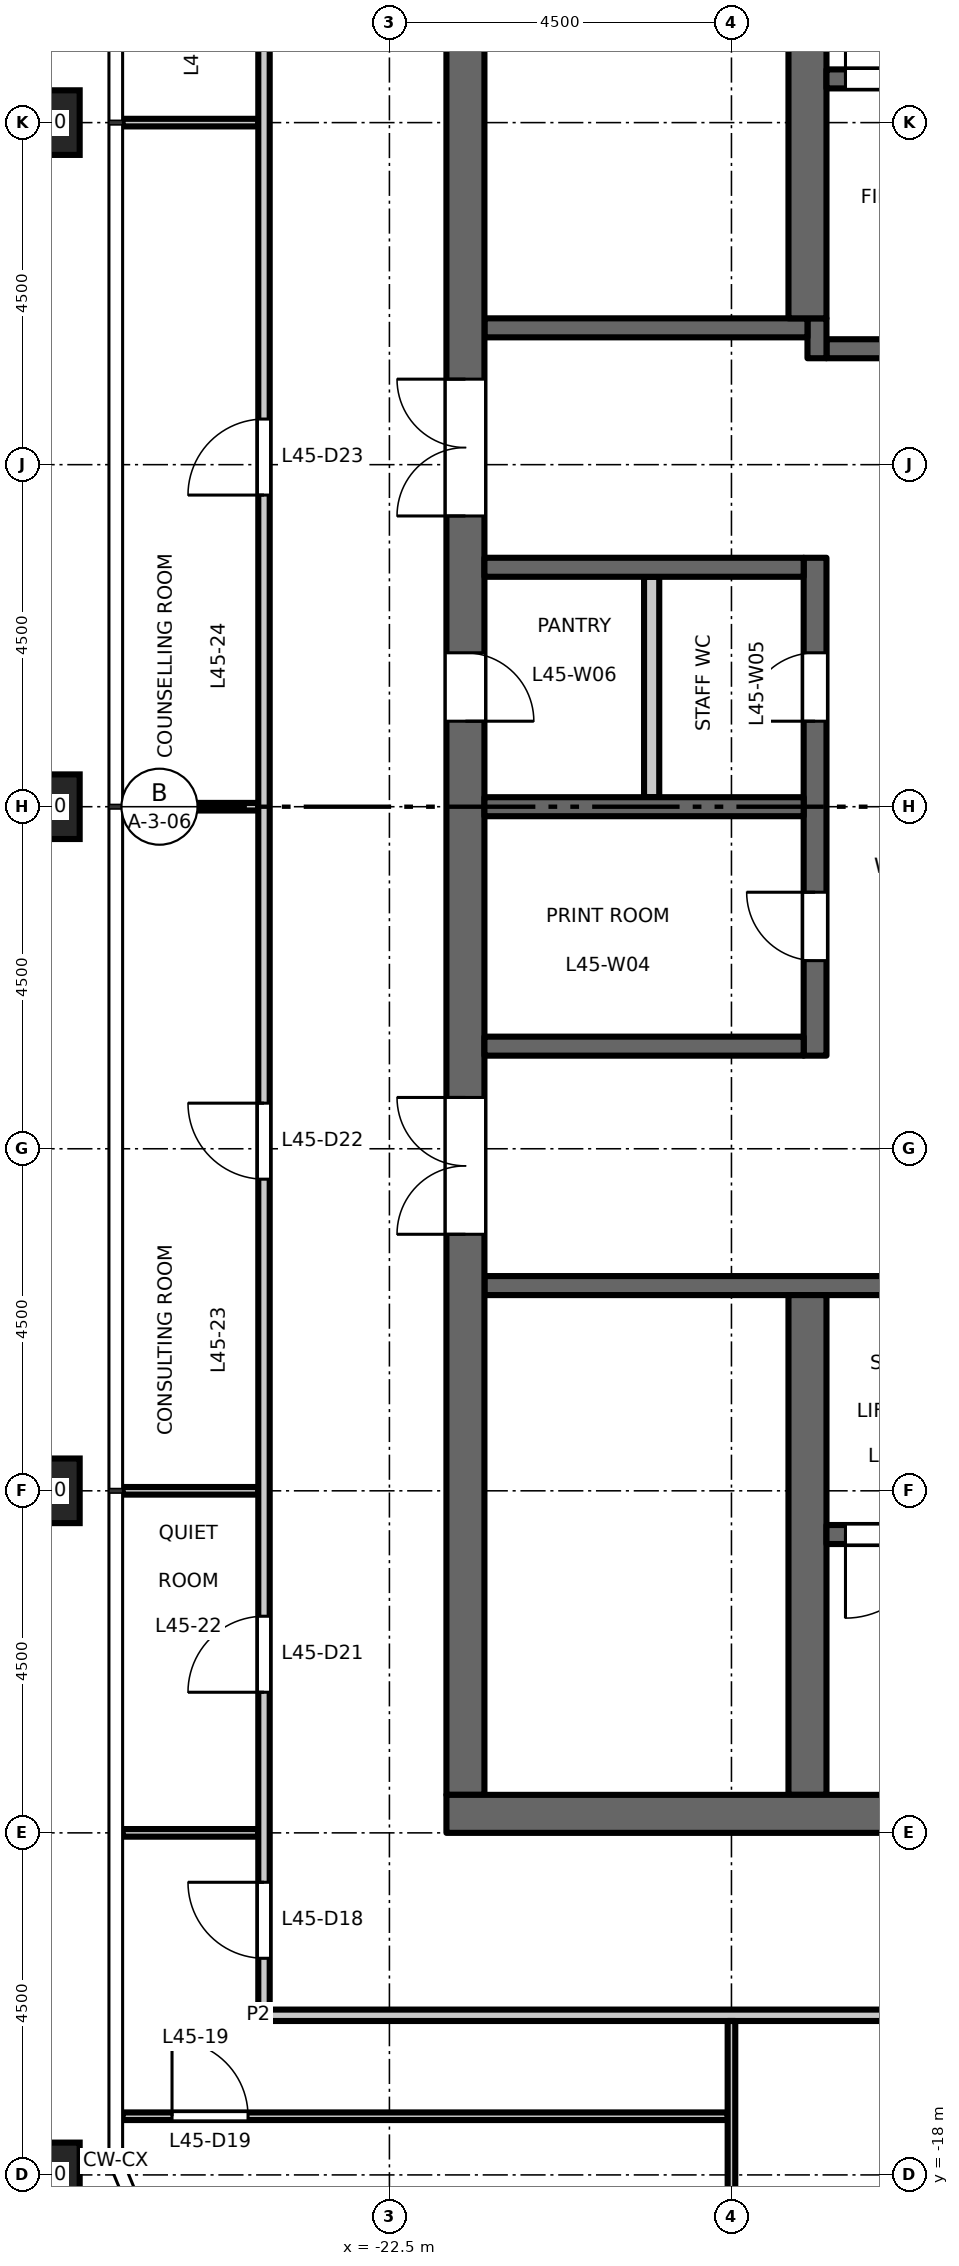
"""IFC4 building model, lengths in metres.
Left out: names, types, materials, properties, quantities, classifications, styles, units other than length and angle.
Written with IfcOpenShell. Run it as: python <this file> out.ifc"""

import sys

from ifc_helpers import new_model, si_unit, direction, frame, frame_2d, origin, origin_2d, place, context, subcontext, project, spatial, rectangle, hollow_rectangle, extrude, element, fill, save


model = new_model("IFC4")
c1 = context("Model", 3, precision=1e-05, world=origin(), true_north=direction((0.0, 1.0)))
c2 = subcontext(c1, "Body", "Model", "MODEL_VIEW")
j1 = project(units=[si_unit("LENGTHUNIT", "METRE"), si_unit("PLANEANGLEUNIT", "RADIAN")], contexts=[c1])
p1 = place(None, origin())
s1 = spatial("IfcSite", under=j1, at=p1, CompositionType="ELEMENT")
p2 = place(p1, origin())
s2 = spatial("IfcBuilding", under=s1, at=p2, CompositionType="ELEMENT")
p3 = place(p2, frame((0.0, 0.0, 210.7)))
s3 = spatial("IfcBuildingStorey", under=s2, at=p3, CompositionType="ELEMENT", Elevation=210.7)
for number, where, z_axis, x_axis in (
    (1, (-27.0, 9.0, 0.0), (0.0, 0.0, 1.0), (1.0, 0.0, 0.0)),
    (2, (-27.0, 0.0, 0.0), (0.0, 0.0, 1.0), (1.0, 0.0, 0.0)),
    (3, (-27.0, -9.0, 0.0), (0.0, 0.0, 1.0), (1.0, 0.0, 0.0)),
    (4, (-27.0, -18.0, 0.0), (0.0, 0.0, 1.0), (1.0, 0.0, 0.0)),
):
    element("IfcColumn", number, at=place(p3, frame(where, z_axis=z_axis, x_axis=x_axis)), inside=s3, PredefinedType="COLUMN", context=c2, shape_type="SweptSolid", body=[
        extrude(hollow_rectangle(XDim=0.85, YDim=0.85, WallThickness=0.05, at=origin_2d()), origin(), (0.0, 0.0, 1.0), 4.5),
    ])
p4 = place(p3, frame((-12.15, 6.025, 0.0), z_axis=(0.0, 0.0, 1.0), x_axis=(-1.0, 0.0, 0.0)))
e5 = element("IfcWall", 5, at=p4, inside=s3, PredefinedType="SHEAR", context=c2, shape_type="SweptSolid", body=[
    extrude(rectangle(XDim=4.6, YDim=0.25, at=frame_2d((2.3, 0.0))), origin(), (0.0, 0.0, 1.0), 4.35),
])
p5 = place(p4, frame((1.8, 0.0, 0.0)))
e6 = element("IfcOpeningElement", 6, at=p5, cuts=e5, PredefinedType="OPENING", context=c2, shape_type="SweptSolid", body=[
    extrude(rectangle(XDim=1.0, YDim=2.1, at=frame_2d((0.5, 1.05))), frame((0.0, 0.135, 0.0), z_axis=(0.0, -1.0, 0.0), x_axis=(1.0, 0.0, 0.0)), (0.0, 0.0, 1.0), 0.27),
])
p6 = place(p3, frame((-16.875, 5.9, 0.0), z_axis=(0.0, 0.0, 1.0), x_axis=(0.0, 1.0, 0.0)))
e7 = element("IfcWall", 7, at=p6, inside=s3, PredefinedType="SHEAR", context=c2, shape_type="SweptSolid", body=[
    extrude(rectangle(XDim=0.525, YDim=0.25, at=frame_2d((0.263, 0.0))), origin(), (0.0, 0.0, 1.0), 4.35),
])
p7 = place(p3, frame((-17.0, 6.3, 0.0), z_axis=(0.0, 0.0, 1.0), x_axis=(-1.0, 0.0, 0.0)))
e8 = element("IfcWall", 8, at=p7, inside=s3, PredefinedType="SHEAR", context=c2, shape_type="SweptSolid", body=[
    extrude(rectangle(XDim=4.25, YDim=0.25, at=frame_2d((2.125, 0.0))), origin(), (0.0, 0.0, 1.0), 4.35),
])
p8 = place(p3, frame((-12.15, -6.3, 0.0), z_axis=(0.0, 0.0, 1.0), x_axis=(-1.0, 0.0, 0.0)))
e9 = element("IfcWall", 9, at=p8, inside=s3, PredefinedType="SHEAR", context=c2, shape_type="SweptSolid", body=[
    extrude(rectangle(XDim=9.1, YDim=0.25, at=frame_2d((4.55, 0.0))), origin(), (0.0, 0.0, 1.0), 4.35),
])
p9 = place(p8, frame((1.8, 0.0, 0.0)))
e10 = element("IfcOpeningElement", 10, at=p9, cuts=e9, PredefinedType="OPENING", context=c2, shape_type="SweptSolid", body=[
    extrude(rectangle(XDim=1.0, YDim=2.1, at=frame_2d((0.5, 1.05))), frame((0.0, 0.135, 0.0), z_axis=(0.0, -1.0, 0.0), x_axis=(1.0, 0.0, 0.0)), (0.0, 0.0, 1.0), 0.27),
])
p10 = place(p3, frame((-21.5, -13.0, 0.0), z_axis=(0.0, 0.0, 1.0), x_axis=(0.0, 1.0, 0.0)))
e11 = element("IfcWall", 11, at=p10, inside=s3, PredefinedType="SHEAR", context=c2, shape_type="SweptSolid", body=[
    extrude(rectangle(XDim=26.0, YDim=0.5, at=frame_2d((13.0, 0.0))), origin(), (0.0, 0.0, 1.0), 4.35),
])
p11 = place(p10, frame((16.825, 0.0, 0.0)))
e12 = element("IfcOpeningElement", 12, at=p11, cuts=e11, PredefinedType="OPENING", context=c2, shape_type="SweptSolid", body=[
    extrude(rectangle(XDim=1.8, YDim=2.1, at=frame_2d((0.9, 1.05))), frame((0.0, 0.26, 0.0), z_axis=(0.0, -1.0, 0.0), x_axis=(1.0, 0.0, 0.0)), (0.0, 0.0, 1.0), 0.52),
])
p12 = place(p10, frame((7.375, 0.0, 0.0)))
e13 = element("IfcOpeningElement", 13, at=p12, cuts=e11, PredefinedType="OPENING", context=c2, shape_type="SweptSolid", body=[
    extrude(rectangle(XDim=1.8, YDim=2.1, at=frame_2d((0.9, 1.05))), frame((0.0, 0.26, 0.0), z_axis=(0.0, -1.0, 0.0), x_axis=(1.0, 0.0, 0.0)), (0.0, 0.0, 1.0), 0.52),
])
p13 = place(p10, frame((14.125, 0.0, 0.0)))
e14 = element("IfcOpeningElement", 14, at=p13, cuts=e11, PredefinedType="OPENING", context=c2, shape_type="SweptSolid", body=[
    extrude(rectangle(XDim=0.9, YDim=2.1, at=frame_2d((0.45, 1.05))), frame((0.0, 0.26, 0.0), z_axis=(0.0, -1.0, 0.0), x_axis=(1.0, 0.0, 0.0)), (0.0, 0.0, 1.0), 0.52),
])
p14 = place(p3, frame((-16.9, -3.275, 0.0), z_axis=(0.0, 0.0, 1.0), x_axis=(0.0, 1.0, 0.0)))
e15 = element("IfcWall", 15, at=p14, inside=s3, PredefinedType="SHEAR", context=c2, shape_type="SweptSolid", body=[
    extrude(rectangle(XDim=6.55, YDim=0.3, at=frame_2d((3.275, 0.0))), origin(), (0.0, 0.0, 1.0), 4.35),
])
p15 = place(p14, frame((1.25, 0.0, 0.0)))
e16 = element("IfcOpeningElement", 16, at=p15, cuts=e15, PredefinedType="OPENING", context=c2, shape_type="SweptSolid", body=[
    extrude(rectangle(XDim=0.9, YDim=2.1, at=frame_2d((0.45, 1.05))), frame((0.0, 0.16, 0.0), z_axis=(0.0, -1.0, 0.0), x_axis=(1.0, 0.0, 0.0)), (0.0, 0.0, 1.0), 0.32),
])
p16 = place(p14, frame((4.4, 0.0, 0.0)))
e17 = element("IfcOpeningElement", 17, at=p16, cuts=e15, PredefinedType="OPENING", context=c2, shape_type="SweptSolid", body=[
    extrude(rectangle(XDim=0.9, YDim=2.1, at=frame_2d((0.45, 1.05))), frame((0.0, 0.16, 0.0), z_axis=(0.0, -1.0, 0.0), x_axis=(1.0, 0.0, 0.0)), (0.0, 0.0, 1.0), 0.32),
])
for number, where, z_axis, x_axis in (
    (18, (-17.05, 0.0, 0.0), (0.0, 0.0, 1.0), (-1.0, 0.0, 0.0)),
    (19, (-17.05, 3.15, 0.0), (0.0, 0.0, 1.0), (-1.0, 0.0, 0.0)),
    (20, (-17.05, -3.15, 0.0), (0.0, 0.0, 1.0), (-1.0, 0.0, 0.0)),
):
    element("IfcWall", number, at=place(p3, frame(where, z_axis=z_axis, x_axis=x_axis)), inside=s3, PredefinedType="SHEAR", context=c2, shape_type="SweptSolid", body=[
        extrude(rectangle(XDim=4.2, YDim=0.25, at=frame_2d((2.1, 0.0))), origin(), (0.0, 0.0, 1.0), 4.35),
    ])
p17 = place(p3, frame((-19.05, 0.125, 0.0), z_axis=(0.0, 0.0, 1.0), x_axis=(0.0, 1.0, 0.0)))
e21 = element("IfcWall", 21, at=p17, inside=s3, PredefinedType="PARTITIONING", context=c2, shape_type="SweptSolid", body=[
    extrude(rectangle(XDim=2.9, YDim=0.2, at=frame_2d((1.45, 0.0))), origin(), (0.0, 0.0, 1.0), 4.35),
])
for number, where, z_axis, x_axis in (
    (22, (-17.0, 6.425, 0.0), (0.0, 0.0, 1.0), (0.0, 1.0, 0.0)),
    (23, (-17.0, -13.0, 0.0), (0.0, 0.0, 1.0), (0.0, 1.0, 0.0)),
):
    element("IfcWall", number, at=place(p3, frame(where, z_axis=z_axis, x_axis=x_axis)), inside=s3, PredefinedType="SHEAR", context=c2, shape_type="SweptSolid", body=[
        extrude(rectangle(XDim=6.575, YDim=0.5, at=frame_2d((3.288, 0.0))), origin(), (0.0, 0.0, 1.0), 4.35),
    ])
p18 = place(p3, frame((-8.75, 9.575, 0.0), z_axis=(0.0, 0.0, 1.0), x_axis=(-1.0, 0.0, 0.0)))
e24 = element("IfcWall", 24, at=p18, inside=s3, PredefinedType="SHEAR", context=c2, shape_type="SweptSolid", body=[
    extrude(rectangle(XDim=8.0, YDim=0.25, at=frame_2d((4.0, 0.0))), origin(), (0.0, 0.0, 1.0), 4.35),
])
p19 = place(p18, frame((6.65, 0.0, 0.0)))
e25 = element("IfcOpeningElement", 25, at=p19, cuts=e24, PredefinedType="OPENING", context=c2, shape_type="SweptSolid", body=[
    extrude(rectangle(XDim=1.1, YDim=2.1, at=frame_2d((0.55, 1.05))), frame((0.0, 0.135, 0.0), z_axis=(0.0, -1.0, 0.0), x_axis=(1.0, 0.0, 0.0)), (0.0, 0.0, 1.0), 0.27),
])
p20 = place(p3, frame((-8.75, -9.575, 0.0), z_axis=(0.0, 0.0, 1.0), x_axis=(-1.0, 0.0, 0.0)))
e26 = element("IfcWall", 26, at=p20, inside=s3, PredefinedType="SHEAR", context=c2, shape_type="SweptSolid", body=[
    extrude(rectangle(XDim=8.0, YDim=0.25, at=frame_2d((4.0, 0.0))), origin(), (0.0, 0.0, 1.0), 4.35),
])
p21 = place(p20, frame((6.65, 0.0, 0.0)))
e27 = element("IfcOpeningElement", 27, at=p21, cuts=e26, PredefinedType="OPENING", context=c2, shape_type="SweptSolid", body=[
    extrude(rectangle(XDim=1.1, YDim=2.1, at=frame_2d((0.55, 1.05))), frame((0.0, 0.135, 0.0), z_axis=(0.0, -1.0, 0.0), x_axis=(1.0, 0.0, 0.0)), (0.0, 0.0, 1.0), 0.27),
])
p22 = place(p3, frame((-8.25, -13.25, 0.0), z_axis=(0.0, 0.0, 1.0), x_axis=(-1.0, 0.0, 0.0)))
e28 = element("IfcWall", 28, at=p22, inside=s3, PredefinedType="SHEAR", context=c2, shape_type="SweptSolid", body=[
    extrude(rectangle(XDim=13.5, YDim=0.5, at=frame_2d((6.75, 0.0))), origin(), (0.0, 0.0, 1.0), 4.35),
])
p23 = place(p3, frame((-26.01, -17.228, 0.0), z_axis=(0.0, 0.0, 1.0), x_axis=(1.0, 0.0, 0.0)))
e29 = element("IfcWall", 29, at=p23, inside=s3, PredefinedType="PARTITIONING", context=c2, shape_type="SweptSolid", body=[
    extrude(rectangle(XDim=7.96, YDim=0.1, at=frame_2d((3.98, 0.0))), origin(), (0.0, 0.0, 1.0), 4.35),
])
p24 = place(p23, frame((0.65, 0.0, 0.0)))
e30 = element("IfcOpeningElement", 30, at=p24, cuts=e29, PredefinedType="OPENING", context=c2, shape_type="SweptSolid", body=[
    extrude(rectangle(XDim=1.0, YDim=2.1, at=frame_2d((0.5, 1.05))), frame((0.0, 0.06, 0.0), z_axis=(0.0, -1.0, 0.0), x_axis=(1.0, 0.0, 0.0)), (0.0, 0.0, 1.0), 0.12),
])
p25 = place(p3, frame((-24.225, -15.9, 0.0), z_axis=(0.0, 0.0, 1.0), x_axis=(1.0, 0.0, 0.0)))
e31 = element("IfcWall", 31, at=p25, inside=s3, PredefinedType="PARTITIONING", context=c2, shape_type="SweptSolid", body=[
    extrude(rectangle(XDim=48.45, YDim=0.15, at=frame_2d((24.225, 0.0))), origin(), (0.0, 0.0, 1.0), 4.35),
])
p26 = place(p25, frame((10.125, 0.0, 0.0)))
e32 = element("IfcOpeningElement", 32, at=p26, cuts=e31, PredefinedType="OPENING", context=c2, shape_type="SweptSolid", body=[
    extrude(rectangle(XDim=1.0, YDim=2.1, at=frame_2d((0.5, 1.05))), frame((0.0, 0.085, 0.0), z_axis=(0.0, -1.0, 0.0), x_axis=(1.0, 0.0, 0.0)), (0.0, 0.0, 1.0), 0.17),
])
p27 = place(p25, frame((19.125, 0.0, 0.0)))
e33 = element("IfcOpeningElement", 33, at=p27, cuts=e31, PredefinedType="OPENING", context=c2, shape_type="SweptSolid", body=[
    extrude(rectangle(XDim=1.0, YDim=2.1, at=frame_2d((0.5, 1.05))), frame((0.0, 0.085, 0.0), z_axis=(0.0, -1.0, 0.0), x_axis=(1.0, 0.0, 0.0)), (0.0, 0.0, 1.0), 0.17),
])
p28 = place(p25, frame((28.125, 0.0, 0.0)))
e34 = element("IfcOpeningElement", 34, at=p28, cuts=e31, PredefinedType="OPENING", context=c2, shape_type="SweptSolid", body=[
    extrude(rectangle(XDim=1.0, YDim=2.1, at=frame_2d((0.5, 1.05))), frame((0.0, 0.085, 0.0), z_axis=(0.0, -1.0, 0.0), x_axis=(1.0, 0.0, 0.0)), (0.0, 0.0, 1.0), 0.17),
])
p29 = place(p25, frame((37.125, 0.0, 0.0)))
e35 = element("IfcOpeningElement", 35, at=p29, cuts=e31, PredefinedType="OPENING", context=c2, shape_type="SweptSolid", body=[
    extrude(rectangle(XDim=1.0, YDim=2.1, at=frame_2d((0.5, 1.05))), frame((0.0, 0.085, 0.0), z_axis=(0.0, -1.0, 0.0), x_axis=(1.0, 0.0, 0.0)), (0.0, 0.0, 1.0), 0.17),
])
p30 = place(p25, frame((44.875, 0.0, 0.0)))
e36 = element("IfcOpeningElement", 36, at=p30, cuts=e31, PredefinedType="OPENING", context=c2, shape_type="SweptSolid", body=[
    extrude(rectangle(XDim=1.0, YDim=2.1, at=frame_2d((0.5, 1.05))), frame((0.0, 0.085, 0.0), z_axis=(0.0, -1.0, 0.0), x_axis=(1.0, 0.0, 0.0)), (0.0, 0.0, 1.0), 0.17),
])
p31 = place(p3, frame((-26.01, -13.5, 0.0), z_axis=(0.0, 0.0, 1.0), x_axis=(1.0, 0.0, 0.0)))
e37 = element("IfcWall", 37, at=p31, inside=s3, PredefinedType="PARTITIONING", context=c2, shape_type="SweptSolid", body=[
    extrude(rectangle(XDim=1.785, YDim=0.1, at=frame_2d((0.893, 0.0))), origin(), (0.0, 0.0, 1.0), 3.95),
])
for number, where, z_axis, x_axis in (
    (38, (-26.01, -9.0, 0.0), (0.0, 0.0, 1.0), (1.0, 0.0, 0.0)),
    (39, (-26.01, 0.0, 0.0), (0.0, 0.0, 1.0), (1.0, 0.0, 0.0)),
    (40, (-26.01, 9.0, 0.0), (0.0, 0.0, 1.0), (1.0, 0.0, 0.0)),
):
    element("IfcWall", number, at=place(p3, frame(where, z_axis=z_axis, x_axis=x_axis)), inside=s3, PredefinedType="PARTITIONING", context=c2, shape_type="SweptSolid", body=[
        extrude(rectangle(XDim=1.785, YDim=0.1, at=frame_2d((0.893, 0.0))), origin(), (0.0, 0.0, 1.0), 4.35),
    ])
p32 = place(p3, frame((-24.15, -15.825, 0.0), z_axis=(0.0, 0.0, 1.0), x_axis=(0.0, 1.0, 0.0)))
e41 = element("IfcWall", 41, at=p32, inside=s3, PredefinedType="PARTITIONING", context=c2, shape_type="SweptSolid", body=[
    extrude(rectangle(XDim=31.65, YDim=0.15, at=frame_2d((15.825, 0.0))), origin(), (0.0, 0.0, 1.0), 4.35),
])
p33 = place(p32, frame((0.675, 0.0, 0.0)))
e42 = element("IfcOpeningElement", 42, at=p33, cuts=e41, PredefinedType="OPENING", context=c2, shape_type="SweptSolid", body=[
    extrude(rectangle(XDim=1.0, YDim=2.1, at=frame_2d((0.5, 1.05))), frame((0.0, 0.085, 0.0), z_axis=(0.0, -1.0, 0.0), x_axis=(1.0, 0.0, 0.0)), (0.0, 0.0, 1.0), 0.17),
])
p34 = place(p32, frame((4.175, 0.0, 0.0)))
e43 = element("IfcOpeningElement", 43, at=p34, cuts=e41, PredefinedType="OPENING", context=c2, shape_type="SweptSolid", body=[
    extrude(rectangle(XDim=1.0, YDim=2.1, at=frame_2d((0.5, 1.05))), frame((0.0, 0.085, 0.0), z_axis=(0.0, -1.0, 0.0), x_axis=(1.0, 0.0, 0.0)), (0.0, 0.0, 1.0), 0.17),
])
p35 = place(p32, frame((10.925, 0.0, 0.0)))
e44 = element("IfcOpeningElement", 44, at=p35, cuts=e41, PredefinedType="OPENING", context=c2, shape_type="SweptSolid", body=[
    extrude(rectangle(XDim=1.0, YDim=2.1, at=frame_2d((0.5, 1.05))), frame((0.0, 0.085, 0.0), z_axis=(0.0, -1.0, 0.0), x_axis=(1.0, 0.0, 0.0)), (0.0, 0.0, 1.0), 0.17),
])
p36 = place(p32, frame((19.925, 0.0, 0.0)))
e45 = element("IfcOpeningElement", 45, at=p36, cuts=e41, PredefinedType="OPENING", context=c2, shape_type="SweptSolid", body=[
    extrude(rectangle(XDim=1.0, YDim=2.1, at=frame_2d((0.5, 1.05))), frame((0.0, 0.085, 0.0), z_axis=(0.0, -1.0, 0.0), x_axis=(1.0, 0.0, 0.0)), (0.0, 0.0, 1.0), 0.17),
])
p37 = place(p32, frame((26.675, 0.0, 0.0)))
e46 = element("IfcOpeningElement", 46, at=p37, cuts=e41, PredefinedType="OPENING", context=c2, shape_type="SweptSolid", body=[
    extrude(rectangle(XDim=1.0, YDim=2.1, at=frame_2d((0.5, 1.05))), frame((0.0, 0.085, 0.0), z_axis=(0.0, -1.0, 0.0), x_axis=(1.0, 0.0, 0.0)), (0.0, 0.0, 1.0), 0.17),
])
p38 = place(p3, frame((-18.0, -25.928, 0.0), z_axis=(0.0, 0.0, 1.0), x_axis=(0.0, 1.0, 0.0)))
e47 = element("IfcWall", 47, at=p38, inside=s3, PredefinedType="PARTITIONING", context=c2, shape_type="SweptSolid", body=[
    extrude(rectangle(XDim=9.953, YDim=0.1, at=frame_2d((4.977, 0.0))), origin(), (0.0, 0.0, 1.0), 3.65),
])
p39 = place(p19, origin())
e48 = element("IfcDoor", 48, at=p39, inside=s3, OperationType="SINGLE_SWING_RIGHT", PredefinedType="DOOR", context=c2, shape_type="SweptSolid", body=[
    extrude(rectangle(XDim=1.1, YDim=2.1, at=frame_2d((0.55, 1.05))), frame((0.0, 0.025, 0.0), z_axis=(0.0, -1.0, 0.0), x_axis=(1.0, 0.0, 0.0)), (0.0, 0.0, 1.0), 0.05),
])
fill(e25, e48)
p40 = place(p21, origin())
e49 = element("IfcDoor", 49, at=p40, inside=s3, OperationType="SINGLE_SWING_LEFT", PredefinedType="DOOR", context=c2, shape_type="SweptSolid", body=[
    extrude(rectangle(XDim=1.1, YDim=2.1, at=frame_2d((0.55, 1.05))), frame((0.0, 0.025, 0.0), z_axis=(0.0, -1.0, 0.0), x_axis=(1.0, 0.0, 0.0)), (0.0, 0.0, 1.0), 0.05),
])
fill(e27, e49)
p41 = place(p11, origin())
e50 = element("IfcDoor", 50, at=p41, inside=s3, OperationType="DOUBLE_DOOR_DOUBLE_SWING", PredefinedType="DOOR", context=c2, shape_type="SweptSolid", body=[
    extrude(rectangle(XDim=1.8, YDim=2.1, at=frame_2d((0.9, 1.05))), frame((0.0, 0.025, 0.0), z_axis=(0.0, -1.0, 0.0), x_axis=(1.0, 0.0, 0.0)), (0.0, 0.0, 1.0), 0.05),
])
fill(e12, e50)
p42 = place(p12, origin())
e51 = element("IfcDoor", 51, at=p42, inside=s3, OperationType="DOUBLE_DOOR_DOUBLE_SWING", PredefinedType="DOOR", context=c2, shape_type="SweptSolid", body=[
    extrude(rectangle(XDim=1.8, YDim=2.1, at=frame_2d((0.9, 1.05))), frame((0.0, 0.025, 0.0), z_axis=(0.0, -1.0, 0.0), x_axis=(1.0, 0.0, 0.0)), (0.0, 0.0, 1.0), 0.05),
])
fill(e13, e51)
p43 = place(p15, origin())
e52 = element("IfcDoor", 52, at=p43, inside=s3, OperationType="SINGLE_SWING_LEFT", PredefinedType="DOOR", context=c2, shape_type="SweptSolid", body=[
    extrude(rectangle(XDim=0.9, YDim=2.1, at=frame_2d((0.45, 1.05))), frame((0.0, 0.025, 0.0), z_axis=(0.0, -1.0, 0.0), x_axis=(1.0, 0.0, 0.0)), (0.0, 0.0, 1.0), 0.05),
])
fill(e16, e52)
p44 = place(p16, origin())
e53 = element("IfcDoor", 53, at=p44, inside=s3, OperationType="SINGLE_SWING_RIGHT", PredefinedType="DOOR", context=c2, shape_type="SweptSolid", body=[
    extrude(rectangle(XDim=0.9, YDim=2.1, at=frame_2d((0.45, 1.05))), frame((0.0, 0.025, 0.0), z_axis=(0.0, -1.0, 0.0), x_axis=(1.0, 0.0, 0.0)), (0.0, 0.0, 1.0), 0.05),
])
fill(e17, e53)
p45 = place(p13, origin())
e54 = element("IfcDoor", 54, at=p45, inside=s3, OperationType="SINGLE_SWING_LEFT", PredefinedType="DOOR", context=c2, shape_type="SweptSolid", body=[
    extrude(rectangle(XDim=0.9, YDim=2.1, at=frame_2d((0.45, 1.05))), frame((0.0, 0.025, 0.0), z_axis=(0.0, -1.0, 0.0), x_axis=(1.0, 0.0, 0.0)), (0.0, 0.0, 1.0), 0.05),
])
fill(e14, e54)
p46 = place(p33, origin())
e55 = element("IfcDoor", 55, at=p46, inside=s3, OperationType="SINGLE_SWING_RIGHT", PredefinedType="DOOR", context=c2, shape_type="SweptSolid", body=[
    extrude(rectangle(XDim=1.0, YDim=2.1, at=frame_2d((0.5, 1.05))), frame((0.0, 0.025, 0.0), z_axis=(0.0, -1.0, 0.0), x_axis=(1.0, 0.0, 0.0)), (0.0, 0.0, 1.0), 0.05),
])
fill(e42, e55)
p47 = place(p24, origin())
e56 = element("IfcDoor", 56, at=p47, inside=s3, OperationType="SINGLE_SWING_LEFT", PredefinedType="DOOR", context=c2, shape_type="SweptSolid", body=[
    extrude(rectangle(XDim=1.0, YDim=2.1, at=frame_2d((0.5, 1.05))), frame((0.0, 0.025, 0.0), z_axis=(0.0, -1.0, 0.0), x_axis=(1.0, 0.0, 0.0)), (0.0, 0.0, 1.0), 0.05),
])
fill(e30, e56)
p48 = place(p34, origin())
e57 = element("IfcDoor", 57, at=p48, inside=s3, OperationType="SINGLE_SWING_LEFT", PredefinedType="DOOR", context=c2, shape_type="SweptSolid", body=[
    extrude(rectangle(XDim=1.0, YDim=2.1, at=frame_2d((0.5, 1.05))), frame((0.0, 0.025, 0.0), z_axis=(0.0, -1.0, 0.0), x_axis=(1.0, 0.0, 0.0)), (0.0, 0.0, 1.0), 0.05),
])
fill(e43, e57)
p49 = place(p35, origin())
e58 = element("IfcDoor", 58, at=p49, inside=s3, OperationType="SINGLE_SWING_RIGHT", PredefinedType="DOOR", context=c2, shape_type="SweptSolid", body=[
    extrude(rectangle(XDim=1.0, YDim=2.1, at=frame_2d((0.5, 1.05))), frame((0.0, 0.025, 0.0), z_axis=(0.0, -1.0, 0.0), x_axis=(1.0, 0.0, 0.0)), (0.0, 0.0, 1.0), 0.05),
])
fill(e44, e58)
p50 = place(p36, origin())
e59 = element("IfcDoor", 59, at=p50, inside=s3, OperationType="SINGLE_SWING_LEFT", PredefinedType="DOOR", context=c2, shape_type="SweptSolid", body=[
    extrude(rectangle(XDim=1.0, YDim=2.1, at=frame_2d((0.5, 1.05))), frame((0.0, 0.025, 0.0), z_axis=(0.0, -1.0, 0.0), x_axis=(1.0, 0.0, 0.0)), (0.0, 0.0, 1.0), 0.05),
])
fill(e45, e59)
save(model, sys.argv[1])
